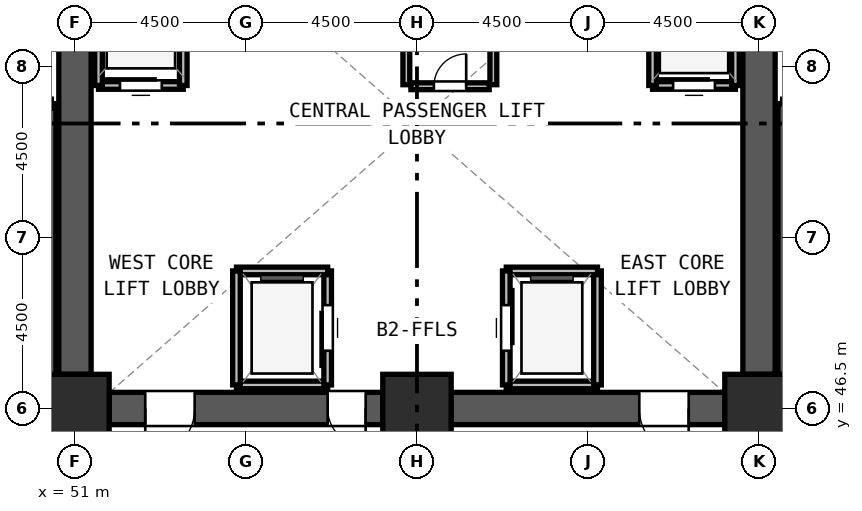
"""IFC4 building model, lengths in metres.
Left out: names, types, materials, properties, quantities, classifications, styles, units other than length and angle.
Written with IfcOpenShell. Run it as: python <this file> out.ifc"""

import sys

from ifc_helpers import new_model, si_unit, direction, frame, frame_2d, origin, origin_2d, place, context, subcontext, project, spatial, rectangle, extrude, source, transform, mapped, element, fill, save


model = new_model("IFC4")
c1 = context("Model", 3, precision=1e-05, world=origin(), true_north=direction((0.0, 1.0)))
c2 = subcontext(c1, "Body", "Model", "MODEL_VIEW")
j1 = project(units=[si_unit("LENGTHUNIT", "METRE"), si_unit("PLANEANGLEUNIT", "RADIAN")], contexts=[c1])
p1 = place(None, origin())
s1 = spatial("IfcSite", under=j1, at=p1, CompositionType="ELEMENT")
p2 = place(p1, origin())
s2 = spatial("IfcBuilding", under=s1, at=p2, CompositionType="ELEMENT")
p3 = place(p2, frame((0.0, 0.0, -9.6)))
s3 = spatial("IfcBuildingStorey", under=s2, at=p3, CompositionType="ELEMENT", Elevation=-9.6)
m1 = source(origin(), c2, "Body", "SweptSolid", [
    extrude(rectangle(XDim=1.8, YDim=1.8, at=origin_2d()), origin(), (0.0, 0.0, 1.0), 4.8),
])
for number, where, z_axis, x_axis in (
    (1, (51.0, 46.5, 0.0), (0.0, 0.0, 1.0), (1.0, 0.0, 0.0)),
    (2, (60.0, 46.5, 0.0), (0.0, 0.0, 1.0), (1.0, 0.0, 0.0)),
    (3, (69.0, 46.5, 0.0), (0.0, 0.0, 1.0), (1.0, 0.0, 0.0)),
):
    element("IfcColumn", number, at=place(p3, frame(where, z_axis=z_axis, x_axis=x_axis)), inside=s3, PredefinedType="COLUMN", context=c2, shape_type="MappedRepresentation", body=[
        mapped(m1, transform((0.0, 0.0, 0.0), x_axis=(1.0, 0.0, 0.0), y_axis=(0.0, 1.0, 0.0), z_axis=(0.0, 0.0, 1.0), scale=1.0)),
    ])
p4 = place(p3, frame((69.0, 60.6, 0.0), z_axis=(0.0, 0.0, 1.0), x_axis=(0.0, -1.0, 0.0)))
e4 = element("IfcWall", 4, at=p4, inside=s3, PredefinedType="SHEAR", context=c2, shape_type="SweptSolid", body=[
    extrude(rectangle(XDim=13.2, YDim=0.85, at=frame_2d((6.6, 0.0))), origin(), (0.0, 0.0, 1.0), 4.5),
])
m2 = source(origin(), c2, "Body", "SweptSolid", [
    extrude(rectangle(XDim=1.2, YDim=2.2, at=frame_2d((0.6, 1.1))), frame((0.0, 0.435, 0.0), z_axis=(0.0, -1.0, 0.0), x_axis=(1.0, 0.0, 0.0)), (0.0, 0.0, 1.0), 0.87),
])
p5 = place(p4, frame((1.05, 0.0, 0.0)))
e5 = element("IfcOpeningElement", 5, at=p5, cuts=e4, PredefinedType="OPENING", context=c2, shape_type="MappedRepresentation", body=[
    mapped(m2, transform((0.0, 0.0, 0.0), x_axis=(1.0, 0.0, 0.0), y_axis=(0.0, 1.0, 0.0), z_axis=(0.0, 0.0, 1.0), scale=1.0)),
])
p6 = place(p3, frame((68.1, 46.5, 0.0), z_axis=(0.0, 0.0, 1.0), x_axis=(-1.0, 0.0, 0.0)))
e6 = element("IfcWall", 6, at=p6, inside=s3, PredefinedType="SHEAR", context=c2, shape_type="SweptSolid", body=[
    extrude(rectangle(XDim=7.2, YDim=0.85, at=frame_2d((3.6, 0.0))), origin(), (0.0, 0.0, 1.0), 4.5),
])
m3 = source(origin(), c2, "Body", "SweptSolid", [
    extrude(rectangle(XDim=1.3, YDim=2.2, at=frame_2d((0.65, 1.1))), frame((0.0, 0.435, 0.0), z_axis=(0.0, -1.0, 0.0), x_axis=(1.0, 0.0, 0.0)), (0.0, 0.0, 1.0), 0.87),
])
p7 = place(p6, frame((0.95, 0.0, 0.0)))
e7 = element("IfcOpeningElement", 7, at=p7, cuts=e6, PredefinedType="OPENING", context=c2, shape_type="MappedRepresentation", body=[
    mapped(m3, transform((0.0, 0.0, 0.0), x_axis=(1.0, 0.0, 0.0), y_axis=(0.0, 1.0, 0.0), z_axis=(0.0, 0.0, 1.0), scale=1.0)),
])
p8 = place(p3, frame((59.1, 46.5, 0.0), z_axis=(0.0, 0.0, 1.0), x_axis=(-1.0, 0.0, 0.0)))
e8 = element("IfcWall", 8, at=p8, inside=s3, PredefinedType="SHEAR", context=c2, shape_type="SweptSolid", body=[
    extrude(rectangle(XDim=7.2, YDim=0.85, at=frame_2d((3.6, 0.0))), origin(), (0.0, 0.0, 1.0), 4.5),
])
p9 = place(p8, frame((4.95, 0.0, 0.0)))
e9 = element("IfcOpeningElement", 9, at=p9, cuts=e8, PredefinedType="OPENING", context=c2, shape_type="MappedRepresentation", body=[
    mapped(m3, transform((0.0, 0.0, 0.0), x_axis=(1.0, 0.0, 0.0), y_axis=(0.0, 1.0, 0.0), z_axis=(0.0, 0.0, 1.0), scale=1.0)),
])
m4 = source(origin(), c2, "Body", "SweptSolid", [
    extrude(rectangle(XDim=1.0, YDim=2.2, at=frame_2d((0.5, 1.1))), frame((0.0, 0.435, 0.0), z_axis=(0.0, -1.0, 0.0), x_axis=(1.0, 0.0, 0.0)), (0.0, 0.0, 1.0), 0.87),
])
p10 = place(p8, frame((0.45, 0.0, 0.0)))
e10 = element("IfcOpeningElement", 10, at=p10, cuts=e8, PredefinedType="OPENING", context=c2, shape_type="MappedRepresentation", body=[
    mapped(m4, transform((0.0, 0.0, 0.0), x_axis=(1.0, 0.0, 0.0), y_axis=(0.0, 1.0, 0.0), z_axis=(0.0, 0.0, 1.0), scale=1.0)),
])
p11 = place(p3, frame((51.0, 47.4, 0.0), z_axis=(0.0, 0.0, 1.0), x_axis=(0.0, 1.0, 0.0)))
e11 = element("IfcWall", 11, at=p11, inside=s3, PredefinedType="SHEAR", context=c2, shape_type="SweptSolid", body=[
    extrude(rectangle(XDim=13.2, YDim=0.85, at=frame_2d((6.6, 0.0))), origin(), (0.0, 0.0, 1.0), 4.5),
])
m5 = source(origin(), c2, "Body", "SweptSolid", [
    extrude(rectangle(XDim=1.1, YDim=2.2, at=frame_2d((0.55, 1.1))), frame((0.0, 0.435, 0.0), z_axis=(0.0, -1.0, 0.0), x_axis=(1.0, 0.0, 0.0)), (0.0, 0.0, 1.0), 0.87),
])
p12 = place(p11, frame((11.5, 0.0, 0.0)))
e12 = element("IfcOpeningElement", 12, at=p12, cuts=e11, PredefinedType="OPENING", context=c2, shape_type="MappedRepresentation", body=[
    mapped(m5, transform((0.0, 0.0, 0.0), x_axis=(1.0, 0.0, 0.0), y_axis=(0.0, 1.0, 0.0), z_axis=(0.0, 0.0, 1.0), scale=1.0)),
])
for number, where, z_axis, x_axis in (
    (13, (50.38, 46.7, 0.0), (0.0, 0.0, 1.0), (0.0, 1.0, 0.0)),
    (14, (69.62, 54.52, 0.0), (0.0, 0.0, 1.0), (0.0, -1.0, 0.0)),
):
    element("IfcWall", number, at=place(p3, frame(where, z_axis=z_axis, x_axis=x_axis)), inside=s3, PredefinedType="SOLIDWALL", context=c2, shape_type="SweptSolid", body=[
        extrude(rectangle(XDim=7.82, YDim=0.24, at=frame_2d((3.91, 0.0))), origin(), (0.0, 0.0, 1.0), 4.5),
    ])
p13 = place(p3, frame((55.25, 47.12, 0.0), z_axis=(0.0, 0.0, 1.0), x_axis=(1.0, 0.0, 0.0)))
e15 = element("IfcWall", 15, at=p13, inside=s3, PredefinedType="SOLIDWALL", context=c2, shape_type="SweptSolid", body=[
    extrude(rectangle(XDim=2.4, YDim=0.2, at=frame_2d((1.2, 0.0))), origin(), (0.0, 0.0, 1.0), 4.5),
])
p14 = place(p3, frame((57.65, 47.12, 0.0), z_axis=(0.0, 0.0, 1.0), x_axis=(0.0, 1.0, 0.0)))
e16 = element("IfcWall", 16, at=p14, inside=s3, PredefinedType="SOLIDWALL", context=c2, shape_type="SweptSolid", body=[
    extrude(rectangle(XDim=3.0, YDim=0.2, at=frame_2d((1.5, 0.0))), origin(), (0.0, 0.0, 1.0), 4.5),
])
m6 = source(origin(), c2, "Body", "SweptSolid", [
    extrude(rectangle(XDim=1.2, YDim=2.3, at=frame_2d((0.6, 1.15))), frame((0.0, 0.11, 0.0), z_axis=(0.0, -1.0, 0.0), x_axis=(1.0, 0.0, 0.0)), (0.0, 0.0, 1.0), 0.22),
])
p15 = place(p14, frame((0.9, 0.0, 0.0)))
e17 = element("IfcOpeningElement", 17, at=p15, cuts=e16, PredefinedType="OPENING", context=c2, shape_type="MappedRepresentation", body=[
    mapped(m6, transform((0.0, 0.0, 0.0), x_axis=(1.0, 0.0, 0.0), y_axis=(0.0, 1.0, 0.0), z_axis=(0.0, 0.0, 1.0), scale=1.0)),
])
p16 = place(p3, frame((57.65, 50.12, 0.0), z_axis=(0.0, 0.0, 1.0), x_axis=(-1.0, 0.0, 0.0)))
e18 = element("IfcWall", 18, at=p16, inside=s3, PredefinedType="SOLIDWALL", context=c2, shape_type="SweptSolid", body=[
    extrude(rectangle(XDim=2.4, YDim=0.2, at=frame_2d((1.2, 0.0))), origin(), (0.0, 0.0, 1.0), 4.5),
])
p17 = place(p3, frame((55.25, 50.12, 0.0), z_axis=(0.0, 0.0, 1.0), x_axis=(0.0, -1.0, 0.0)))
e19 = element("IfcWall", 19, at=p17, inside=s3, PredefinedType="SOLIDWALL", context=c2, shape_type="SweptSolid", body=[
    extrude(rectangle(XDim=3.0, YDim=0.2, at=frame_2d((1.5, 0.0))), origin(), (0.0, 0.0, 1.0), 4.5),
])
p18 = place(p3, frame((62.35, 47.12, 0.0), z_axis=(0.0, 0.0, 1.0), x_axis=(1.0, 0.0, 0.0)))
e20 = element("IfcWall", 20, at=p18, inside=s3, PredefinedType="SOLIDWALL", context=c2, shape_type="SweptSolid", body=[
    extrude(rectangle(XDim=2.4, YDim=0.2, at=frame_2d((1.2, 0.0))), origin(), (0.0, 0.0, 1.0), 4.5),
])
p19 = place(p3, frame((64.75, 47.12, 0.0), z_axis=(0.0, 0.0, 1.0), x_axis=(0.0, 1.0, 0.0)))
e21 = element("IfcWall", 21, at=p19, inside=s3, PredefinedType="SOLIDWALL", context=c2, shape_type="SweptSolid", body=[
    extrude(rectangle(XDim=3.0, YDim=0.2, at=frame_2d((1.5, 0.0))), origin(), (0.0, 0.0, 1.0), 4.5),
])
p20 = place(p3, frame((64.75, 50.12, 0.0), z_axis=(0.0, 0.0, 1.0), x_axis=(-1.0, 0.0, 0.0)))
e22 = element("IfcWall", 22, at=p20, inside=s3, PredefinedType="SOLIDWALL", context=c2, shape_type="SweptSolid", body=[
    extrude(rectangle(XDim=2.4, YDim=0.2, at=frame_2d((1.2, 0.0))), origin(), (0.0, 0.0, 1.0), 4.5),
])
p21 = place(p3, frame((62.35, 50.12, 0.0), z_axis=(0.0, 0.0, 1.0), x_axis=(0.0, -1.0, 0.0)))
e23 = element("IfcWall", 23, at=p21, inside=s3, PredefinedType="SOLIDWALL", context=c2, shape_type="SweptSolid", body=[
    extrude(rectangle(XDim=3.0, YDim=0.2, at=frame_2d((1.5, 0.0))), origin(), (0.0, 0.0, 1.0), 4.5),
])
p22 = place(p21, frame((0.9, 0.0, 0.0)))
e24 = element("IfcOpeningElement", 24, at=p22, cuts=e23, PredefinedType="OPENING", context=c2, shape_type="MappedRepresentation", body=[
    mapped(m6, transform((0.0, 0.0, 0.0), x_axis=(1.0, 0.0, 0.0), y_axis=(0.0, 1.0, 0.0), z_axis=(0.0, 0.0, 1.0), scale=1.0)),
])
p23 = place(p3, frame((51.62, 55.0, 0.0), z_axis=(0.0, 0.0, 1.0), x_axis=(1.0, 0.0, 0.0)))
e25 = element("IfcWall", 25, at=p23, inside=s3, PredefinedType="SOLIDWALL", context=c2, shape_type="SweptSolid", body=[
    extrude(rectangle(XDim=2.23, YDim=0.2, at=frame_2d((1.115, 0.0))), origin(), (0.0, 0.0, 1.0), 4.5),
])
m7 = source(origin(), c2, "Body", "SweptSolid", [
    extrude(rectangle(XDim=1.1, YDim=2.2, at=frame_2d((0.55, 1.1))), frame((0.0, 0.11, 0.0), z_axis=(0.0, -1.0, 0.0), x_axis=(1.0, 0.0, 0.0)), (0.0, 0.0, 1.0), 0.22),
])
p24 = place(p23, frame((0.565, 0.0, 0.0)))
e26 = element("IfcOpeningElement", 26, at=p24, cuts=e25, PredefinedType="OPENING", context=c2, shape_type="MappedRepresentation", body=[
    mapped(m7, transform((0.0, 0.0, 0.0), x_axis=(1.0, 0.0, 0.0), y_axis=(0.0, 1.0, 0.0), z_axis=(0.0, 0.0, 1.0), scale=1.0)),
])
for number, where, z_axis, x_axis in (
    (27, (53.85, 55.0, 0.0), (0.0, 0.0, 1.0), (0.0, 1.0, 0.0)),
    (28, (51.62, 58.0, 0.0), (0.0, 0.0, 1.0), (0.0, -1.0, 0.0)),
):
    element("IfcWall", number, at=place(p3, frame(where, z_axis=z_axis, x_axis=x_axis)), inside=s3, PredefinedType="SOLIDWALL", context=c2, shape_type="SweptSolid", body=[
        extrude(rectangle(XDim=3.0, YDim=0.2, at=frame_2d((1.5, 0.0))), origin(), (0.0, 0.0, 1.0), 4.5),
    ])
p25 = place(p3, frame((66.2, 55.0, 0.0), z_axis=(0.0, 0.0, 1.0), x_axis=(1.0, 0.0, 0.0)))
e29 = element("IfcWall", 29, at=p25, inside=s3, PredefinedType="SOLIDWALL", context=c2, shape_type="SweptSolid", body=[
    extrude(rectangle(XDim=2.18, YDim=0.2, at=frame_2d((1.09, 0.0))), origin(), (0.0, 0.0, 1.0), 4.5),
])
p26 = place(p25, frame((0.54, 0.0, 0.0)))
e30 = element("IfcOpeningElement", 30, at=p26, cuts=e29, PredefinedType="OPENING", context=c2, shape_type="MappedRepresentation", body=[
    mapped(m7, transform((0.0, 0.0, 0.0), x_axis=(1.0, 0.0, 0.0), y_axis=(0.0, 1.0, 0.0), z_axis=(0.0, 0.0, 1.0), scale=1.0)),
])
for number, where, z_axis, x_axis in (
    (31, (68.38, 55.0, 0.0), (0.0, 0.0, 1.0), (0.0, 1.0, 0.0)),
    (32, (66.2, 57.75, 0.0), (0.0, 0.0, 1.0), (0.0, -1.0, 0.0)),
):
    element("IfcWall", number, at=place(p3, frame(where, z_axis=z_axis, x_axis=x_axis)), inside=s3, PredefinedType="SOLIDWALL", context=c2, shape_type="SweptSolid", body=[
        extrude(rectangle(XDim=2.75, YDim=0.2, at=frame_2d((1.375, 0.0))), origin(), (0.0, 0.0, 1.0), 4.5),
    ])
p27 = place(p3, frame((59.84, 54.98, 0.0), z_axis=(0.0, 0.0, 1.0), x_axis=(1.0, 0.0, 0.0)))
e33 = element("IfcWall", 33, at=p27, inside=s3, PredefinedType="PARTITIONING", context=c2, shape_type="SweptSolid", body=[
    extrude(rectangle(XDim=2.06, YDim=0.18, at=frame_2d((1.03, 0.0))), origin(), (0.0, 0.0, 1.0), 4.5),
])
m8 = source(origin(), c2, "Body", "SweptSolid", [
    extrude(rectangle(XDim=0.85, YDim=2.1, at=frame_2d((0.425, 1.05))), frame((0.0, 0.1, 0.0), z_axis=(0.0, -1.0, 0.0), x_axis=(1.0, 0.0, 0.0)), (0.0, 0.0, 1.0), 0.2),
])
p28 = place(p27, frame((0.605, 0.0, 0.0)))
e34 = element("IfcOpeningElement", 34, at=p28, cuts=e33, PredefinedType="OPENING", context=c2, shape_type="MappedRepresentation", body=[
    mapped(m8, transform((0.0, 0.0, 0.0), x_axis=(1.0, 0.0, 0.0), y_axis=(0.0, 1.0, 0.0), z_axis=(0.0, 0.0, 1.0), scale=1.0)),
])
for number, where, z_axis, x_axis in (
    (35, (59.72, 55.02, 0.0), (0.0, 0.0, 1.0), (0.0, 1.0, 0.0)),
    (36, (62.01, 55.02, 0.0), (0.0, 0.0, 1.0), (0.0, 1.0, 0.0)),
):
    element("IfcWall", number, at=place(p3, frame(where, z_axis=z_axis, x_axis=x_axis)), inside=s3, PredefinedType="PARTITIONING", context=c2, shape_type="SweptSolid", body=[
        extrude(rectangle(XDim=2.88, YDim=0.18, at=frame_2d((1.44, 0.0))), origin(), (0.0, 0.0, 1.0), 4.5),
    ])
m9 = source(origin(), c2, "Body", "SweptSolid", [
    extrude(rectangle(XDim=1.3, YDim=2.2, at=frame_2d((0.65, 1.1))), frame((0.0, 0.025, 0.0), z_axis=(0.0, -1.0, 0.0), x_axis=(1.0, 0.0, 0.0)), (0.0, 0.0, 1.0), 0.05),
])
p29 = place(p9, origin())
e37 = element("IfcDoor", 37, at=p29, inside=s3, OperationType="SINGLE_SWING_RIGHT", PredefinedType="DOOR", context=c2, shape_type="MappedRepresentation", body=[
    mapped(m9, transform((0.0, 0.0, 0.0), x_axis=(1.0, 0.0, 0.0), y_axis=(0.0, 1.0, 0.0), z_axis=(0.0, 0.0, 1.0), scale=1.0)),
])
fill(e9, e37)
m10 = source(origin(), c2, "Body", "SweptSolid", [
    extrude(rectangle(XDim=1.0, YDim=2.2, at=frame_2d((0.5, 1.1))), frame((0.0, 0.025, 0.0), z_axis=(0.0, -1.0, 0.0), x_axis=(1.0, 0.0, 0.0)), (0.0, 0.0, 1.0), 0.05),
])
p30 = place(p10, origin())
e38 = element("IfcDoor", 38, at=p30, inside=s3, OperationType="SINGLE_SWING_LEFT", PredefinedType="DOOR", context=c2, shape_type="MappedRepresentation", body=[
    mapped(m10, transform((0.0, 0.0, 0.0), x_axis=(1.0, 0.0, 0.0), y_axis=(0.0, 1.0, 0.0), z_axis=(0.0, 0.0, 1.0), scale=1.0)),
])
fill(e10, e38)
p31 = place(p7, origin())
e39 = element("IfcDoor", 39, at=p31, inside=s3, OperationType="SINGLE_SWING_LEFT", PredefinedType="DOOR", context=c2, shape_type="MappedRepresentation", body=[
    mapped(m9, transform((0.0, 0.0, 0.0), x_axis=(1.0, 0.0, 0.0), y_axis=(0.0, 1.0, 0.0), z_axis=(0.0, 0.0, 1.0), scale=1.0)),
])
fill(e7, e39)
m11 = source(origin(), c2, "Body", "SweptSolid", [
    extrude(rectangle(XDim=1.2, YDim=2.3, at=frame_2d((0.6, 1.15))), frame((0.0, 0.025, 0.0), z_axis=(0.0, -1.0, 0.0), x_axis=(1.0, 0.0, 0.0)), (0.0, 0.0, 1.0), 0.05),
])
p32 = place(p15, origin())
e40 = element("IfcDoor", 40, at=p32, inside=s3, OperationType="SLIDING_TO_LEFT", PredefinedType="DOOR", context=c2, shape_type="MappedRepresentation", body=[
    mapped(m11, transform((0.0, 0.0, 0.0), x_axis=(1.0, 0.0, 0.0), y_axis=(0.0, 1.0, 0.0), z_axis=(0.0, 0.0, 1.0), scale=1.0)),
])
fill(e17, e40)
p33 = place(p22, origin())
e41 = element("IfcDoor", 41, at=p33, inside=s3, OperationType="SLIDING_TO_LEFT", PredefinedType="DOOR", context=c2, shape_type="MappedRepresentation", body=[
    mapped(m11, transform((0.0, 0.0, 0.0), x_axis=(1.0, 0.0, 0.0), y_axis=(0.0, 1.0, 0.0), z_axis=(0.0, 0.0, 1.0), scale=1.0)),
])
fill(e24, e41)
m12 = source(origin(), c2, "Body", "SweptSolid", [
    extrude(rectangle(XDim=1.1, YDim=2.2, at=frame_2d((0.55, 1.1))), frame((0.0, 0.025, 0.0), z_axis=(0.0, -1.0, 0.0), x_axis=(1.0, 0.0, 0.0)), (0.0, 0.0, 1.0), 0.05),
])
p34 = place(p24, origin())
e42 = element("IfcDoor", 42, at=p34, inside=s3, OperationType="SLIDING_TO_LEFT", PredefinedType="DOOR", context=c2, shape_type="MappedRepresentation", body=[
    mapped(m12, transform((0.0, 0.0, 0.0), x_axis=(1.0, 0.0, 0.0), y_axis=(0.0, 1.0, 0.0), z_axis=(0.0, 0.0, 1.0), scale=1.0)),
])
fill(e26, e42)
p35 = place(p26, origin())
e43 = element("IfcDoor", 43, at=p35, inside=s3, OperationType="SLIDING_TO_LEFT", PredefinedType="DOOR", context=c2, shape_type="MappedRepresentation", body=[
    mapped(m12, transform((0.0, 0.0, 0.0), x_axis=(1.0, 0.0, 0.0), y_axis=(0.0, 1.0, 0.0), z_axis=(0.0, 0.0, 1.0), scale=1.0)),
])
fill(e30, e43)
m13 = source(origin(), c2, "Body", "SweptSolid", [
    extrude(rectangle(XDim=0.85, YDim=2.1, at=frame_2d((0.425, 1.05))), frame((0.0, 0.025, 0.0), z_axis=(0.0, -1.0, 0.0), x_axis=(1.0, 0.0, 0.0)), (0.0, 0.0, 1.0), 0.05),
])
p36 = place(p28, origin())
e44 = element("IfcDoor", 44, at=p36, inside=s3, OperationType="SINGLE_SWING_RIGHT", PredefinedType="DOOR", context=c2, shape_type="MappedRepresentation", body=[
    mapped(m13, transform((0.0, 0.0, 0.0), x_axis=(1.0, 0.0, 0.0), y_axis=(0.0, 1.0, 0.0), z_axis=(0.0, 0.0, 1.0), scale=1.0)),
])
fill(e34, e44)
save(model, sys.argv[1])
